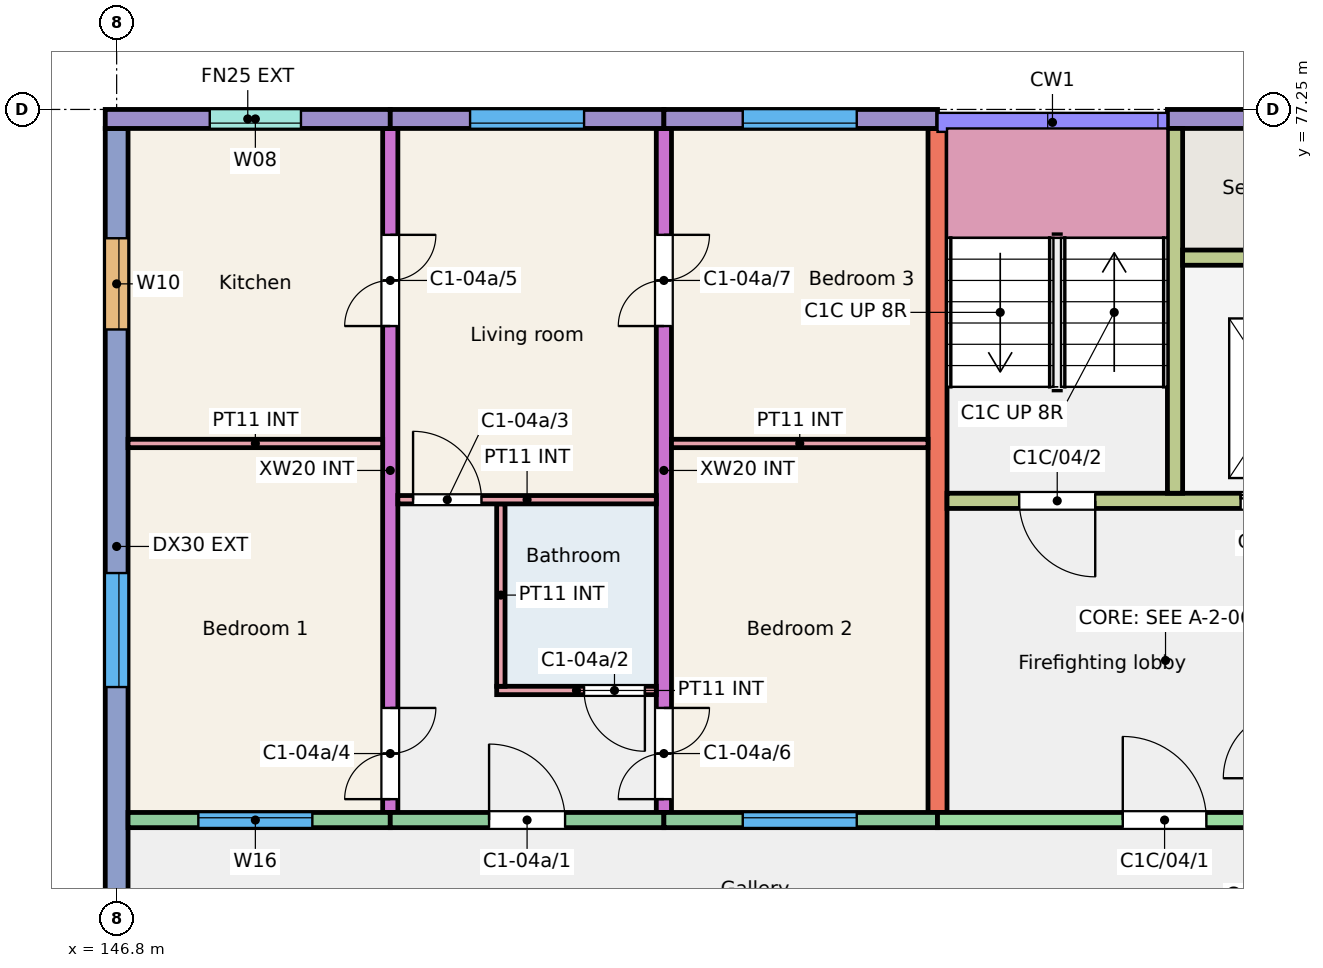
"""IFC4 building model, lengths in metres.
Left out: names, types, materials, properties, quantities, classifications, styles, units other than length and angle.
Written with IfcOpenShell. Run it as: python <this file> out.ifc"""

import sys

from ifc_helpers import new_model, si_unit, direction, frame, frame_2d, origin, place, context, subcontext, project, spatial, rectangle, extrude, element, fill, save


model = new_model("IFC4")
c1 = context("Model", 3, precision=1e-05, world=origin(), true_north=direction((0.0, 1.0)))
c2 = subcontext(c1, "Body", "Model", "MODEL_VIEW")
j1 = project(units=[si_unit("LENGTHUNIT", "METRE"), si_unit("PLANEANGLEUNIT", "RADIAN")], contexts=[c1])
p1 = place(None, origin())
s1 = spatial("IfcSite", under=j1, at=p1, CompositionType="ELEMENT")
p2 = place(p1, origin())
s2 = spatial("IfcBuilding", under=s1, at=p2, CompositionType="ELEMENT")
p3 = place(p2, frame((0.0, 0.0, 12.0)))
s3 = spatial("IfcBuildingStorey", under=s2, at=p3, CompositionType="ELEMENT", Elevation=12.0)
p4 = place(p3, frame((146.8, 66.0, 0.0), z_axis=(0.0, 0.0, 1.0), x_axis=(0.0, 1.0, 0.0)))
e1 = element("IfcWall", 1, at=p4, inside=s3, PredefinedType="SHEAR", context=c2, shape_type="SweptSolid", body=[
    extrude(rectangle(XDim=11.0, YDim=0.3, at=frame_2d((5.5, 0.0))), origin(), (0.0, 0.0, 1.0), 3.0),
])
p5 = place(p4, frame((3.65, 0.0, 0.9)))
e2 = element("IfcOpeningElement", 2, at=p5, cuts=e1, PredefinedType="OPENING", context=c2, shape_type="SweptSolid", body=[
    extrude(rectangle(XDim=1.5, YDim=1.5, at=frame_2d((0.75, 0.75))), frame((0.0, 0.16, 0.0), z_axis=(0.0, -1.0, 0.0), x_axis=(1.0, 0.0, 0.0)), (0.0, 0.0, 1.0), 0.32),
])
p6 = place(p4, frame((8.355, 0.0, 0.9)))
e3 = element("IfcOpeningElement", 3, at=p6, cuts=e1, PredefinedType="OPENING", context=c2, shape_type="SweptSolid", body=[
    extrude(rectangle(XDim=1.2, YDim=1.5, at=frame_2d((0.6, 0.75))), frame((0.0, 0.16, 0.0), z_axis=(0.0, -1.0, 0.0), x_axis=(1.0, 0.0, 0.0)), (0.0, 0.0, 1.0), 0.32),
])
p7 = place(p3, frame((150.4, 68.0, 0.0), z_axis=(0.0, 0.0, 1.0), x_axis=(0.0, 1.0, 0.0)))
e4 = element("IfcWall", 4, at=p7, inside=s3, PredefinedType="SHEAR", context=c2, shape_type="SweptSolid", body=[
    extrude(rectangle(XDim=9.0, YDim=0.2, at=frame_2d((4.5, 0.0))), origin(), (0.0, 0.0, 1.0), 3.0),
])
p8 = place(p7, frame((0.175, 0.0, 0.0)))
e5 = element("IfcOpeningElement", 5, at=p8, cuts=e4, PredefinedType="OPENING", context=c2, shape_type="SweptSolid", body=[
    extrude(rectangle(XDim=1.2, YDim=2.1, at=frame_2d((0.6, 1.05))), frame((0.0, 0.11, 0.0), z_axis=(0.0, -1.0, 0.0), x_axis=(1.0, 0.0, 0.0)), (0.0, 0.0, 1.0), 0.22),
])
p9 = place(p7, frame((6.4, 0.0, 0.0)))
e6 = element("IfcOpeningElement", 6, at=p9, cuts=e4, PredefinedType="OPENING", context=c2, shape_type="SweptSolid", body=[
    extrude(rectangle(XDim=1.2, YDim=2.1, at=frame_2d((0.6, 1.05))), frame((0.0, 0.11, 0.0), z_axis=(0.0, -1.0, 0.0), x_axis=(1.0, 0.0, 0.0)), (0.0, 0.0, 1.0), 0.22),
])
p10 = place(p3, frame((154.0, 68.0, 0.0), z_axis=(0.0, 0.0, 1.0), x_axis=(0.0, 1.0, 0.0)))
e7 = element("IfcWall", 7, at=p10, inside=s3, PredefinedType="SHEAR", context=c2, shape_type="SweptSolid", body=[
    extrude(rectangle(XDim=9.0, YDim=0.2, at=frame_2d((4.5, 0.0))), origin(), (0.0, 0.0, 1.0), 3.0),
])
p11 = place(p10, frame((0.175, 0.0, 0.0)))
e8 = element("IfcOpeningElement", 8, at=p11, cuts=e7, PredefinedType="OPENING", context=c2, shape_type="SweptSolid", body=[
    extrude(rectangle(XDim=1.2, YDim=2.1, at=frame_2d((0.6, 1.05))), frame((0.0, 0.11, 0.0), z_axis=(0.0, -1.0, 0.0), x_axis=(1.0, 0.0, 0.0)), (0.0, 0.0, 1.0), 0.22),
])
p12 = place(p10, frame((6.4, 0.0, 0.0)))
e9 = element("IfcOpeningElement", 9, at=p12, cuts=e7, PredefinedType="OPENING", context=c2, shape_type="SweptSolid", body=[
    extrude(rectangle(XDim=1.2, YDim=2.1, at=frame_2d((0.6, 1.05))), frame((0.0, 0.11, 0.0), z_axis=(0.0, -1.0, 0.0), x_axis=(1.0, 0.0, 0.0)), (0.0, 0.0, 1.0), 0.22),
])
p13 = place(p3, frame((157.6, 68.0, 0.0), z_axis=(0.0, 0.0, 1.0), x_axis=(0.0, 1.0, 0.0)))
e10 = element("IfcWall", 10, at=p13, inside=s3, PredefinedType="SHEAR", context=c2, shape_type="SweptSolid", body=[
    extrude(rectangle(XDim=9.0, YDim=0.25, at=frame_2d((4.5, 0.0))), origin(), (0.0, 0.0, 1.0), 3.0),
])
p14 = place(p3, frame((146.65, 77.125, 0.0), z_axis=(0.0, 0.0, 1.0), x_axis=(1.0, 0.0, 0.0)))
e11 = element("IfcWall", 11, at=p14, inside=s3, PredefinedType="SOLIDWALL", context=c2, shape_type="SweptSolid", body=[
    extrude(rectangle(XDim=3.75, YDim=0.25, at=frame_2d((1.875, 0.0))), origin(), (0.0, 0.0, 1.0), 3.0),
])
p15 = place(p14, frame((1.375, 0.0, 1.1)))
e12 = element("IfcOpeningElement", 12, at=p15, cuts=e11, PredefinedType="OPENING", context=c2, shape_type="SweptSolid", body=[
    extrude(rectangle(XDim=1.2, YDim=1.3, at=frame_2d((0.6, 0.65))), frame((0.0, 0.135, 0.0), z_axis=(0.0, -1.0, 0.0), x_axis=(1.0, 0.0, 0.0)), (0.0, 0.0, 1.0), 0.27),
])
p16 = place(p3, frame((146.95, 67.9, 0.0), z_axis=(0.0, 0.0, 1.0), x_axis=(1.0, 0.0, 0.0)))
e13 = element("IfcWall", 13, at=p16, inside=s3, PredefinedType="SOLIDWALL", context=c2, shape_type="SweptSolid", body=[
    extrude(rectangle(XDim=3.45, YDim=0.2, at=frame_2d((1.725, 0.0))), origin(), (0.0, 0.0, 1.0), 3.0),
])
p17 = place(p16, frame((0.925, 0.0, 0.9)))
e14 = element("IfcOpeningElement", 14, at=p17, cuts=e13, PredefinedType="OPENING", context=c2, shape_type="SweptSolid", body=[
    extrude(rectangle(XDim=1.5, YDim=1.5, at=frame_2d((0.75, 0.75))), frame((0.0, 0.11, 0.0), z_axis=(0.0, -1.0, 0.0), x_axis=(1.0, 0.0, 0.0)), (0.0, 0.0, 1.0), 0.22),
])
p18 = place(p3, frame((150.4, 77.125, 0.0), z_axis=(0.0, 0.0, 1.0), x_axis=(1.0, 0.0, 0.0)))
e15 = element("IfcWall", 15, at=p18, inside=s3, PredefinedType="SOLIDWALL", context=c2, shape_type="SweptSolid", body=[
    extrude(rectangle(XDim=3.6, YDim=0.25, at=frame_2d((1.8, 0.0))), origin(), (0.0, 0.0, 1.0), 3.0),
])
p19 = place(p18, frame((1.05, 0.0, 0.9)))
e16 = element("IfcOpeningElement", 16, at=p19, cuts=e15, PredefinedType="OPENING", context=c2, shape_type="SweptSolid", body=[
    extrude(rectangle(XDim=1.5, YDim=1.5, at=frame_2d((0.75, 0.75))), frame((0.0, 0.135, 0.0), z_axis=(0.0, -1.0, 0.0), x_axis=(1.0, 0.0, 0.0)), (0.0, 0.0, 1.0), 0.27),
])
p20 = place(p3, frame((150.4, 67.9, 0.0), z_axis=(0.0, 0.0, 1.0), x_axis=(1.0, 0.0, 0.0)))
e17 = element("IfcWall", 17, at=p20, inside=s3, PredefinedType="SOLIDWALL", context=c2, shape_type="SweptSolid", body=[
    extrude(rectangle(XDim=3.6, YDim=0.2, at=frame_2d((1.8, 0.0))), origin(), (0.0, 0.0, 1.0), 3.0),
])
p21 = place(p20, frame((1.3, 0.0, 0.0)))
e18 = element("IfcOpeningElement", 18, at=p21, cuts=e17, PredefinedType="OPENING", context=c2, shape_type="SweptSolid", body=[
    extrude(rectangle(XDim=1.0, YDim=2.1, at=frame_2d((0.5, 1.05))), frame((0.0, 0.11, 0.0), z_axis=(0.0, -1.0, 0.0), x_axis=(1.0, 0.0, 0.0)), (0.0, 0.0, 1.0), 0.22),
])
p22 = place(p3, frame((154.0, 77.125, 0.0), z_axis=(0.0, 0.0, 1.0), x_axis=(1.0, 0.0, 0.0)))
e19 = element("IfcWall", 19, at=p22, inside=s3, PredefinedType="SOLIDWALL", context=c2, shape_type="SweptSolid", body=[
    extrude(rectangle(XDim=3.6, YDim=0.25, at=frame_2d((1.8, 0.0))), origin(), (0.0, 0.0, 1.0), 3.0),
])
p23 = place(p22, frame((1.038, 0.0, 0.9)))
e20 = element("IfcOpeningElement", 20, at=p23, cuts=e19, PredefinedType="OPENING", context=c2, shape_type="SweptSolid", body=[
    extrude(rectangle(XDim=1.5, YDim=1.5, at=frame_2d((0.75, 0.75))), frame((0.0, 0.135, 0.0), z_axis=(0.0, -1.0, 0.0), x_axis=(1.0, 0.0, 0.0)), (0.0, 0.0, 1.0), 0.27),
])
p24 = place(p3, frame((154.0, 67.9, 0.0), z_axis=(0.0, 0.0, 1.0), x_axis=(1.0, 0.0, 0.0)))
e21 = element("IfcWall", 21, at=p24, inside=s3, PredefinedType="SOLIDWALL", context=c2, shape_type="SweptSolid", body=[
    extrude(rectangle(XDim=3.6, YDim=0.2, at=frame_2d((1.8, 0.0))), origin(), (0.0, 0.0, 1.0), 3.0),
])
p25 = place(p24, frame((1.038, 0.0, 0.9)))
e22 = element("IfcOpeningElement", 22, at=p25, cuts=e21, PredefinedType="OPENING", context=c2, shape_type="SweptSolid", body=[
    extrude(rectangle(XDim=1.5, YDim=1.5, at=frame_2d((0.75, 0.75))), frame((0.0, 0.11, 0.0), z_axis=(0.0, -1.0, 0.0), x_axis=(1.0, 0.0, 0.0)), (0.0, 0.0, 1.0), 0.22),
])
p26 = place(p3, frame((160.625, 77.125, 0.0), z_axis=(0.0, 0.0, 1.0), x_axis=(1.0, 0.0, 0.0)))
e23 = element("IfcWall", 23, at=p26, inside=s3, PredefinedType="SOLIDWALL", context=c2, shape_type="SweptSolid", body=[
    extrude(rectangle(XDim=2.975, YDim=0.25, at=frame_2d((1.488, 0.0))), origin(), (0.0, 0.0, 1.0), 3.0),
])
p27 = place(p3, frame((157.6, 67.9, 0.0), z_axis=(0.0, 0.0, 1.0), x_axis=(1.0, 0.0, 0.0)))
e24 = element("IfcWall", 24, at=p27, inside=s3, PredefinedType="SHEAR", context=c2, shape_type="SweptSolid", body=[
    extrude(rectangle(XDim=5.85, YDim=0.2, at=frame_2d((2.925, 0.0))), origin(), (0.0, 0.0, 1.0), 3.0),
])
p28 = place(p27, frame((2.438, 0.0, 0.0)))
e25 = element("IfcOpeningElement", 25, at=p28, cuts=e24, PredefinedType="OPENING", context=c2, shape_type="SweptSolid", body=[
    extrude(rectangle(XDim=1.1, YDim=2.1, at=frame_2d((0.55, 1.05))), frame((0.0, 0.11, 0.0), z_axis=(0.0, -1.0, 0.0), x_axis=(1.0, 0.0, 0.0)), (0.0, 0.0, 1.0), 0.22),
])
p29 = place(p3, frame((157.725, 72.1, 0.0), z_axis=(0.0, 0.0, 1.0), x_axis=(1.0, 0.0, 0.0)))
e26 = element("IfcWall", 26, at=p29, inside=s3, PredefinedType="SHEAR", context=c2, shape_type="SweptSolid", body=[
    extrude(rectangle(XDim=5.725, YDim=0.2, at=frame_2d((2.862, 0.0))), origin(), (0.0, 0.0, 1.0), 3.0),
])
p30 = place(p29, frame((0.95, 0.0, 0.0)))
e27 = element("IfcOpeningElement", 27, at=p30, cuts=e26, PredefinedType="OPENING", context=c2, shape_type="SweptSolid", body=[
    extrude(rectangle(XDim=1.0, YDim=2.1, at=frame_2d((0.5, 1.05))), frame((0.0, 0.11, 0.0), z_axis=(0.0, -1.0, 0.0), x_axis=(1.0, 0.0, 0.0)), (0.0, 0.0, 1.0), 0.22),
])
p31 = place(p29, frame((3.863, 0.0, 0.0)))
e28 = element("IfcOpeningElement", 28, at=p31, cuts=e26, PredefinedType="OPENING", context=c2, shape_type="SweptSolid", body=[
    extrude(rectangle(XDim=1.1, YDim=2.1, at=frame_2d((0.55, 1.05))), frame((0.0, 0.11, 0.0), z_axis=(0.0, -1.0, 0.0), x_axis=(1.0, 0.0, 0.0)), (0.0, 0.0, 1.0), 0.22),
])
p32 = place(p3, frame((160.725, 72.2, 0.0), z_axis=(0.0, 0.0, 1.0), x_axis=(0.0, 1.0, 0.0)))
e29 = element("IfcWall", 29, at=p32, inside=s3, PredefinedType="SHEAR", context=c2, shape_type="SweptSolid", body=[
    extrude(rectangle(XDim=4.8, YDim=0.2, at=frame_2d((2.4, 0.0))), origin(), (0.0, 0.0, 1.0), 3.0),
])
p33 = place(p3, frame((160.825, 75.3, 0.0), z_axis=(0.0, 0.0, 1.0), x_axis=(1.0, 0.0, 0.0)))
e30 = element("IfcWall", 30, at=p33, inside=s3, PredefinedType="SHEAR", context=c2, shape_type="SweptSolid", body=[
    extrude(rectangle(XDim=2.625, YDim=0.2, at=frame_2d((1.312, 0.0))), origin(), (0.0, 0.0, 1.0), 3.0),
])
p34 = place(p3, frame((151.8, 69.605, 0.0), z_axis=(0.0, 0.0, 1.0), x_axis=(1.0, 0.0, 0.0)))
e31 = element("IfcWall", 31, at=p34, inside=s3, PredefinedType="PARTITIONING", context=c2, shape_type="SweptSolid", body=[
    extrude(rectangle(XDim=2.1, YDim=0.11, at=frame_2d((1.05, 0.0))), origin(), (0.0, 0.0, 1.0), 2.8),
])
p35 = place(p34, frame((1.15, 0.0, 0.0)))
e32 = element("IfcOpeningElement", 32, at=p35, cuts=e31, PredefinedType="OPENING", context=c2, shape_type="SweptSolid", body=[
    extrude(rectangle(XDim=0.8, YDim=2.1, at=frame_2d((0.4, 1.05))), frame((0.0, 0.065, 0.0), z_axis=(0.0, -1.0, 0.0), x_axis=(1.0, 0.0, 0.0)), (0.0, 0.0, 1.0), 0.13),
])
p36 = place(p3, frame((151.855, 69.66, 0.0), z_axis=(0.0, 0.0, 1.0), x_axis=(0.0, 1.0, 0.0)))
e33 = element("IfcWall", 33, at=p36, inside=s3, PredefinedType="PARTITIONING", context=c2, shape_type="SweptSolid", body=[
    extrude(rectangle(XDim=2.4, YDim=0.11, at=frame_2d((1.2, 0.0))), origin(), (0.0, 0.0, 1.0), 2.8),
])
p37 = place(p3, frame((150.5, 72.115, 0.0), z_axis=(0.0, 0.0, 1.0), x_axis=(1.0, 0.0, 0.0)))
e34 = element("IfcWall", 34, at=p37, inside=s3, PredefinedType="PARTITIONING", context=c2, shape_type="SweptSolid", body=[
    extrude(rectangle(XDim=3.4, YDim=0.11, at=frame_2d((1.7, 0.0))), origin(), (0.0, 0.0, 1.0), 2.8),
])
p38 = place(p37, frame((0.2, 0.0, 0.0)))
e35 = element("IfcOpeningElement", 35, at=p38, cuts=e34, PredefinedType="OPENING", context=c2, shape_type="SweptSolid", body=[
    extrude(rectangle(XDim=0.9, YDim=2.1, at=frame_2d((0.45, 1.05))), frame((0.0, 0.065, 0.0), z_axis=(0.0, -1.0, 0.0), x_axis=(1.0, 0.0, 0.0)), (0.0, 0.0, 1.0), 0.13),
])
p39 = place(p3, frame((146.95, 72.855, 0.0), z_axis=(0.0, 0.0, 1.0), x_axis=(1.0, 0.0, 0.0)))
e36 = element("IfcWall", 36, at=p39, inside=s3, PredefinedType="PARTITIONING", context=c2, shape_type="SweptSolid", body=[
    extrude(rectangle(XDim=3.35, YDim=0.11, at=frame_2d((1.675, 0.0))), origin(), (0.0, 0.0, 1.0), 2.8),
])
p40 = place(p3, frame((154.1, 72.855, 0.0), z_axis=(0.0, 0.0, 1.0), x_axis=(1.0, 0.0, 0.0)))
e37 = element("IfcWall", 37, at=p40, inside=s3, PredefinedType="PARTITIONING", context=c2, shape_type="SweptSolid", body=[
    extrude(rectangle(XDim=3.375, YDim=0.11, at=frame_2d((1.688, 0.0))), origin(), (0.0, 0.0, 1.0), 2.8),
])
p41 = place(p17, origin())
e38 = element("IfcWindow", 38, at=p41, inside=s3, PartitioningType="SINGLE_PANEL", PredefinedType="WINDOW", context=c2, shape_type="SweptSolid", body=[
    extrude(rectangle(XDim=1.5, YDim=1.5, at=frame_2d((0.75, 0.75))), frame((0.0, 0.06, 0.0), z_axis=(0.0, -1.0, 0.0), x_axis=(1.0, 0.0, 0.0)), (0.0, 0.0, 1.0), 0.06),
])
fill(e14, e38)
p42 = place(p15, origin())
e39 = element("IfcWindow", 39, at=p42, inside=s3, PartitioningType="SINGLE_PANEL", PredefinedType="WINDOW", context=c2, shape_type="SweptSolid", body=[
    extrude(rectangle(XDim=1.2, YDim=1.3, at=frame_2d((0.6, 0.65))), frame((0.0, -0.025, 0.0), z_axis=(0.0, -1.0, 0.0), x_axis=(1.0, 0.0, 0.0)), (0.0, 0.0, 1.0), 0.06),
])
fill(e12, e39)
p43 = place(p25, origin())
e40 = element("IfcWindow", 40, at=p43, inside=s3, PartitioningType="SINGLE_PANEL", PredefinedType="WINDOW", context=c2, shape_type="SweptSolid", body=[
    extrude(rectangle(XDim=1.5, YDim=1.5, at=frame_2d((0.75, 0.75))), frame((0.0, 0.06, 0.0), z_axis=(0.0, -1.0, 0.0), x_axis=(1.0, 0.0, 0.0)), (0.0, 0.0, 1.0), 0.06),
])
fill(e22, e40)
p44 = place(p23, origin())
e41 = element("IfcWindow", 41, at=p44, inside=s3, PartitioningType="SINGLE_PANEL", PredefinedType="WINDOW", context=c2, shape_type="SweptSolid", body=[
    extrude(rectangle(XDim=1.5, YDim=1.5, at=frame_2d((0.75, 0.75))), frame((0.0, -0.025, 0.0), z_axis=(0.0, -1.0, 0.0), x_axis=(1.0, 0.0, 0.0)), (0.0, 0.0, 1.0), 0.06),
])
fill(e20, e41)
p45 = place(p19, origin())
e42 = element("IfcWindow", 42, at=p45, inside=s3, PartitioningType="SINGLE_PANEL", PredefinedType="WINDOW", context=c2, shape_type="SweptSolid", body=[
    extrude(rectangle(XDim=1.5, YDim=1.5, at=frame_2d((0.75, 0.75))), frame((0.0, -0.025, 0.0), z_axis=(0.0, -1.0, 0.0), x_axis=(1.0, 0.0, 0.0)), (0.0, 0.0, 1.0), 0.06),
])
fill(e16, e42)
p46 = place(p5, origin())
e43 = element("IfcWindow", 43, at=p46, inside=s3, PartitioningType="SINGLE_PANEL", PredefinedType="WINDOW", context=c2, shape_type="SweptSolid", body=[
    extrude(rectangle(XDim=1.5, YDim=1.5, at=frame_2d((0.75, 0.75))), frame((0.0, 0.0, 0.0), z_axis=(0.0, -1.0, 0.0), x_axis=(1.0, 0.0, 0.0)), (0.0, 0.0, 1.0), 0.06),
])
fill(e2, e43)
p47 = place(p6, origin())
e44 = element("IfcWindow", 44, at=p47, inside=s3, PartitioningType="SINGLE_PANEL", PredefinedType="WINDOW", context=c2, shape_type="SweptSolid", body=[
    extrude(rectangle(XDim=1.2, YDim=1.5, at=frame_2d((0.6, 0.75))), frame((0.0, 0.0, 0.0), z_axis=(0.0, -1.0, 0.0), x_axis=(1.0, 0.0, 0.0)), (0.0, 0.0, 1.0), 0.06),
])
fill(e3, e44)
p48 = place(p21, origin())
e45 = element("IfcDoor", 45, at=p48, inside=s3, OperationType="SINGLE_SWING_LEFT", PredefinedType="DOOR", context=c2, shape_type="SweptSolid", body=[
    extrude(rectangle(XDim=1.0, YDim=2.1, at=frame_2d((0.5, 1.05))), frame((0.0, 0.025, 0.0), z_axis=(0.0, -1.0, 0.0), x_axis=(1.0, 0.0, 0.0)), (0.0, 0.0, 1.0), 0.05),
])
fill(e18, e45)
p49 = place(p35, origin())
e46 = element("IfcDoor", 46, at=p49, inside=s3, OperationType="SINGLE_SWING_RIGHT", PredefinedType="DOOR", context=c2, shape_type="SweptSolid", body=[
    extrude(rectangle(XDim=0.8, YDim=2.1, at=frame_2d((0.4, 1.05))), frame((0.0, 0.025, 0.0), z_axis=(0.0, -1.0, 0.0), x_axis=(1.0, 0.0, 0.0)), (0.0, 0.0, 1.0), 0.05),
])
fill(e32, e46)
p50 = place(p38, origin())
e47 = element("IfcDoor", 47, at=p50, inside=s3, OperationType="SINGLE_SWING_LEFT", PredefinedType="DOOR", context=c2, shape_type="SweptSolid", body=[
    extrude(rectangle(XDim=0.9, YDim=2.1, at=frame_2d((0.45, 1.05))), frame((0.0, 0.025, 0.0), z_axis=(0.0, -1.0, 0.0), x_axis=(1.0, 0.0, 0.0)), (0.0, 0.0, 1.0), 0.05),
])
fill(e35, e47)
p51 = place(p8, origin())
e48 = element("IfcDoor", 48, at=p51, inside=s3, OperationType="DOUBLE_DOOR_SINGLE_SWING", PredefinedType="DOOR", context=c2, shape_type="SweptSolid", body=[
    extrude(rectangle(XDim=1.2, YDim=2.1, at=frame_2d((0.6, 1.05))), frame((0.0, 0.025, 0.0), z_axis=(0.0, -1.0, 0.0), x_axis=(1.0, 0.0, 0.0)), (0.0, 0.0, 1.0), 0.05),
])
fill(e5, e48)
p52 = place(p9, origin())
e49 = element("IfcDoor", 49, at=p52, inside=s3, OperationType="DOUBLE_DOOR_SINGLE_SWING", PredefinedType="DOOR", context=c2, shape_type="SweptSolid", body=[
    extrude(rectangle(XDim=1.2, YDim=2.1, at=frame_2d((0.6, 1.05))), frame((0.0, 0.025, 0.0), z_axis=(0.0, -1.0, 0.0), x_axis=(1.0, 0.0, 0.0)), (0.0, 0.0, 1.0), 0.05),
])
fill(e6, e49)
p53 = place(p11, origin())
e50 = element("IfcDoor", 50, at=p53, inside=s3, OperationType="DOUBLE_DOOR_SINGLE_SWING", PredefinedType="DOOR", context=c2, shape_type="SweptSolid", body=[
    extrude(rectangle(XDim=1.2, YDim=2.1, at=frame_2d((0.6, 1.05))), frame((0.0, 0.025, 0.0), z_axis=(0.0, -1.0, 0.0), x_axis=(1.0, 0.0, 0.0)), (0.0, 0.0, 1.0), 0.05),
])
fill(e8, e50)
p54 = place(p12, origin())
e51 = element("IfcDoor", 51, at=p54, inside=s3, OperationType="DOUBLE_DOOR_SINGLE_SWING", PredefinedType="DOOR", context=c2, shape_type="SweptSolid", body=[
    extrude(rectangle(XDim=1.2, YDim=2.1, at=frame_2d((0.6, 1.05))), frame((0.0, 0.025, 0.0), z_axis=(0.0, -1.0, 0.0), x_axis=(1.0, 0.0, 0.0)), (0.0, 0.0, 1.0), 0.05),
])
fill(e9, e51)
p55 = place(p28, origin())
e52 = element("IfcDoor", 52, at=p55, inside=s3, OperationType="SINGLE_SWING_LEFT", PredefinedType="DOOR", context=c2, shape_type="SweptSolid", body=[
    extrude(rectangle(XDim=1.1, YDim=2.1, at=frame_2d((0.55, 1.05))), frame((0.0, 0.025, 0.0), z_axis=(0.0, -1.0, 0.0), x_axis=(1.0, 0.0, 0.0)), (0.0, 0.0, 1.0), 0.05),
])
fill(e25, e52)
p56 = place(p30, origin())
e53 = element("IfcDoor", 53, at=p56, inside=s3, OperationType="SINGLE_SWING_RIGHT", PredefinedType="DOOR", context=c2, shape_type="SweptSolid", body=[
    extrude(rectangle(XDim=1.0, YDim=2.1, at=frame_2d((0.5, 1.05))), frame((0.0, 0.025, 0.0), z_axis=(0.0, -1.0, 0.0), x_axis=(1.0, 0.0, 0.0)), (0.0, 0.0, 1.0), 0.05),
])
fill(e27, e53)
p57 = place(p31, origin())
e54 = element("IfcDoor", 54, at=p57, inside=s3, OperationType="DOUBLE_DOOR_SLIDING", PredefinedType="DOOR", context=c2, shape_type="SweptSolid", body=[
    extrude(rectangle(XDim=1.1, YDim=2.1, at=frame_2d((0.55, 1.05))), frame((0.0, 0.025, 0.0), z_axis=(0.0, -1.0, 0.0), x_axis=(1.0, 0.0, 0.0)), (0.0, 0.0, 1.0), 0.05),
])
fill(e28, e54)
save(model, sys.argv[1])
